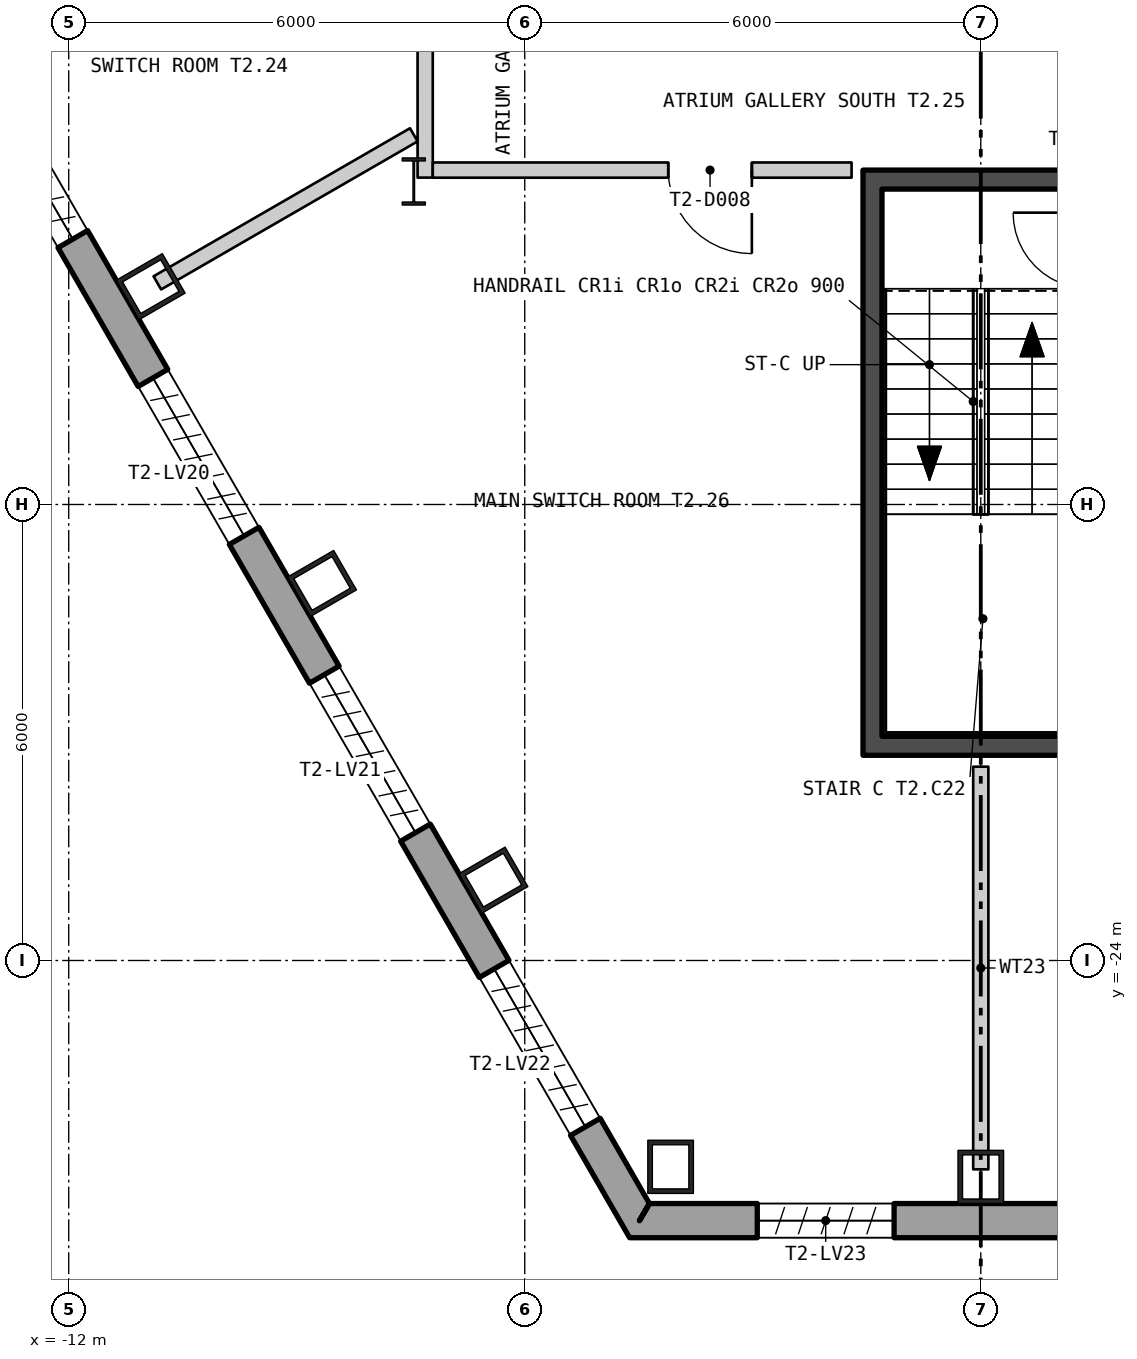
"""IFC4 building model, lengths in metres.
Left out: names, types, materials, properties, quantities, classifications, styles, units other than length and angle.
Written with IfcOpenShell. Run it as: python <this file> out.ifc"""

import sys

from ifc_helpers import new_model, si_unit, direction, frame, frame_2d, origin, origin_2d, place, context, subcontext, project, spatial, polyline, rectangle, hollow_rectangle, i_section, outline, extrude, element, fill, save


model = new_model("IFC4")
c1 = context("Model", 3, precision=1e-05, world=origin(), true_north=direction((0.0, 1.0)))
c2 = subcontext(c1, "Body", "Model", "MODEL_VIEW")
j1 = project(units=[si_unit("LENGTHUNIT", "METRE"), si_unit("PLANEANGLEUNIT", "RADIAN")], contexts=[c1])
p1 = place(None, origin())
s1 = spatial("IfcSite", under=j1, at=p1, CompositionType="ELEMENT")
p2 = place(p1, origin())
s2 = spatial("IfcBuilding", under=s1, at=p2, CompositionType="ELEMENT")
p3 = place(p2, frame((0.0, 0.0, 133.8)))
s3 = spatial("IfcBuildingStorey", under=s2, at=p3, CompositionType="ELEMENT", Elevation=133.8)
for number, where, z_axis, x_axis in (
    (1, (-10.921, -15.134, 0.0), (0.0, 0.0, 1.0), (0.5, -0.866, 0.0)),
    (2, (-8.667, -19.039, 0.0), (0.0, 0.0, 1.0), (0.5, -0.866, 0.0)),
    (3, (-6.412, -22.943, 0.0), (0.0, 0.0, 1.0), (0.5, -0.866, 0.0)),
    (4, (-4.081, -26.715, 0.0), (0.0, 0.0, 1.0), (1.0, 0.0, 0.0)),
    (5, (0.0, -26.848, 0.0), (0.0, 0.0, 1.0), (1.0, 0.0, 0.0)),
):
    element("IfcColumn", number, at=place(p3, frame(where, z_axis=z_axis, x_axis=x_axis)), inside=s3, PredefinedType="COLUMN", context=c2, shape_type="SweptSolid", body=[
        extrude(hollow_rectangle(XDim=0.6, YDim=0.7, WallThickness=0.06, at=origin_2d()), origin(), (0.0, 0.0, 1.0), 6.0),
    ])
p4 = place(p3, frame((-7.46, -13.75, 0.0), z_axis=(0.0, 0.0, 1.0), x_axis=(1.0, 0.0, 0.0)))
e6 = element("IfcColumn", 6, at=p4, inside=s3, PredefinedType="COLUMN", context=c2, shape_type="SweptSolid", body=[
    extrude(i_section(OverallWidth=0.305, OverallDepth=0.62, WebThickness=0.021, FlangeThickness=0.04, at=origin_2d()), origin(), (0.0, 0.0, 1.0), 6.0),
])
p5 = place(p3, frame((-27.365, 12.198, -0.18), z_axis=(0.0, 0.0, 1.0), x_axis=(0.500000335318, -0.866025210188, 0.0)))
e7 = element("IfcWall", 7, at=p5, inside=s3, PredefinedType="SOLIDWALL", context=c2, shape_type="SweptSolid", body=[
    extrude(outline(polyline([(-0.13, -0.225), (45.88, -0.225), (45.62, 0.225), (0.13, 0.225), (-0.13, -0.225)])), origin(), (0.0, 0.0, 1.0), 6.0),
])
p6 = place(p5, frame((1.425, 0.0, 1.38)))
e8 = element("IfcOpeningElement", 8, at=p6, cuts=e7, PredefinedType="OPENING", context=c2, shape_type="SweptSolid", body=[
    extrude(rectangle(XDim=2.4, YDim=3.6, at=frame_2d((1.2, 1.8))), frame((0.0, 0.235, 0.0), z_axis=(0.0, -1.0, 0.0), x_axis=(1.0, 0.0, 0.0)), (0.0, 0.0, 1.0), 0.47),
])
p7 = place(p5, frame((5.895, 0.0, 1.38)))
e9 = element("IfcOpeningElement", 9, at=p7, cuts=e7, PredefinedType="OPENING", context=c2, shape_type="SweptSolid", body=[
    extrude(rectangle(XDim=2.4, YDim=3.6, at=frame_2d((1.2, 1.8))), frame((0.0, 0.235, 0.0), z_axis=(0.0, -1.0, 0.0), x_axis=(1.0, 0.0, 0.0)), (0.0, 0.0, 1.0), 0.47),
])
p8 = place(p5, frame((10.403, 0.0, 1.38)))
e10 = element("IfcOpeningElement", 10, at=p8, cuts=e7, PredefinedType="OPENING", context=c2, shape_type="SweptSolid", body=[
    extrude(rectangle(XDim=2.4, YDim=3.6, at=frame_2d((1.2, 1.8))), frame((0.0, 0.235, 0.0), z_axis=(0.0, -1.0, 0.0), x_axis=(1.0, 0.0, 0.0)), (0.0, 0.0, 1.0), 0.47),
])
p9 = place(p5, frame((14.912, 0.0, 1.38)))
e11 = element("IfcOpeningElement", 11, at=p9, cuts=e7, PredefinedType="OPENING", context=c2, shape_type="SweptSolid", body=[
    extrude(rectangle(XDim=2.4, YDim=3.6, at=frame_2d((1.2, 1.8))), frame((0.0, 0.235, 0.0), z_axis=(0.0, -1.0, 0.0), x_axis=(1.0, 0.0, 0.0)), (0.0, 0.0, 1.0), 0.47),
])
p10 = place(p5, frame((19.421, 0.0, 1.38)))
e12 = element("IfcOpeningElement", 12, at=p10, cuts=e7, PredefinedType="OPENING", context=c2, shape_type="SweptSolid", body=[
    extrude(rectangle(XDim=2.4, YDim=3.6, at=frame_2d((1.2, 1.8))), frame((0.0, 0.235, 0.0), z_axis=(0.0, -1.0, 0.0), x_axis=(1.0, 0.0, 0.0)), (0.0, 0.0, 1.0), 0.47),
])
p11 = place(p5, frame((23.929, 0.0, 1.38)))
e13 = element("IfcOpeningElement", 13, at=p11, cuts=e7, PredefinedType="OPENING", context=c2, shape_type="SweptSolid", body=[
    extrude(rectangle(XDim=2.4, YDim=3.6, at=frame_2d((1.2, 1.8))), frame((0.0, 0.235, 0.0), z_axis=(0.0, -1.0, 0.0), x_axis=(1.0, 0.0, 0.0)), (0.0, 0.0, 1.0), 0.47),
])
p12 = place(p5, frame((28.438, 0.0, 1.38)))
e14 = element("IfcOpeningElement", 14, at=p12, cuts=e7, PredefinedType="OPENING", context=c2, shape_type="SweptSolid", body=[
    extrude(rectangle(XDim=2.4, YDim=3.6, at=frame_2d((1.2, 1.8))), frame((0.0, 0.235, 0.0), z_axis=(0.0, -1.0, 0.0), x_axis=(1.0, 0.0, 0.0)), (0.0, 0.0, 1.0), 0.47),
])
p13 = place(p5, frame((32.947, 0.0, 1.38)))
e15 = element("IfcOpeningElement", 15, at=p13, cuts=e7, PredefinedType="OPENING", context=c2, shape_type="SweptSolid", body=[
    extrude(rectangle(XDim=2.4, YDim=3.6, at=frame_2d((1.2, 1.8))), frame((0.0, 0.235, 0.0), z_axis=(0.0, -1.0, 0.0), x_axis=(1.0, 0.0, 0.0)), (0.0, 0.0, 1.0), 0.47),
])
p14 = place(p5, frame((37.455, 0.0, 1.38)))
e16 = element("IfcOpeningElement", 16, at=p14, cuts=e7, PredefinedType="OPENING", context=c2, shape_type="SweptSolid", body=[
    extrude(rectangle(XDim=2.4, YDim=3.6, at=frame_2d((1.2, 1.8))), frame((0.0, 0.235, 0.0), z_axis=(0.0, -1.0, 0.0), x_axis=(1.0, 0.0, 0.0)), (0.0, 0.0, 1.0), 0.47),
])
p15 = place(p5, frame((41.925, 0.0, 1.38)))
e17 = element("IfcOpeningElement", 17, at=p15, cuts=e7, PredefinedType="OPENING", context=c2, shape_type="SweptSolid", body=[
    extrude(rectangle(XDim=2.4, YDim=3.6, at=frame_2d((1.2, 1.8))), frame((0.0, 0.235, 0.0), z_axis=(0.0, -1.0, 0.0), x_axis=(1.0, 0.0, 0.0)), (0.0, 0.0, 1.0), 0.47),
])
p16 = place(p3, frame((-4.49, -27.423, -0.18), z_axis=(0.0, 0.0, 1.0), x_axis=(1.0, 0.0, 0.0)))
e18 = element("IfcWall", 18, at=p16, inside=s3, PredefinedType="SOLIDWALL", context=c2, shape_type="SweptSolid", body=[
    extrude(outline(polyline([(-0.13, -0.225), (9.11, -0.225), (8.85, 0.225), (0.13, 0.225), (-0.13, -0.225)])), origin(), (0.0, 0.0, 1.0), 6.0),
])
p17 = place(p16, frame((1.549, 0.0, 1.38)))
e19 = element("IfcOpeningElement", 19, at=p17, cuts=e18, PredefinedType="OPENING", context=c2, shape_type="SweptSolid", body=[
    extrude(rectangle(XDim=1.8, YDim=3.6, at=frame_2d((0.9, 1.8))), frame((0.0, 0.235, 0.0), z_axis=(0.0, -1.0, 0.0), x_axis=(1.0, 0.0, 0.0)), (0.0, 0.0, 1.0), 0.47),
])
p18 = place(p16, frame((5.631, 0.0, 1.38)))
e20 = element("IfcOpeningElement", 20, at=p18, cuts=e18, PredefinedType="OPENING", context=c2, shape_type="SweptSolid", body=[
    extrude(rectangle(XDim=1.8, YDim=3.6, at=frame_2d((0.9, 1.8))), frame((0.0, 0.235, 0.0), z_axis=(0.0, -1.0, 0.0), x_axis=(1.0, 0.0, 0.0)), (0.0, 0.0, 1.0), 0.47),
])
p19 = place(p3, frame((-1.425, -21.05, 0.0), z_axis=(0.0, 0.0, 1.0), x_axis=(0.0, 1.0, 0.0)))
e21 = element("IfcWall", 21, at=p19, inside=s3, PredefinedType="SHEAR", context=c2, shape_type="SweptSolid", body=[
    extrude(rectangle(XDim=7.2, YDim=0.25, at=frame_2d((3.6, 0.0))), origin(), (0.0, 0.0, 1.0), 5.8),
])
for number, where, z_axis, x_axis in (
    (22, (-1.55, -21.175, 0.0), (0.0, 0.0, 1.0), (1.0, 0.0, 0.0)),
    (23, (-1.55, -13.725, 0.0), (0.0, 0.0, 1.0), (1.0, 0.0, 0.0)),
):
    element("IfcWall", number, at=place(p3, frame(where, z_axis=z_axis, x_axis=x_axis)), inside=s3, PredefinedType="SHEAR", context=c2, shape_type="SweptSolid", body=[
        extrude(rectangle(XDim=3.1, YDim=0.25, at=frame_2d((1.55, 0.0))), origin(), (0.0, 0.0, 1.0), 5.8),
    ])
p20 = place(p3, frame((-10.834, -15.084, 0.0), z_axis=(0.0, 0.0, 1.0), x_axis=(0.866023159588, 0.500003887042, 0.0)))
e24 = element("IfcWall", 24, at=p20, inside=s3, PredefinedType="PARTITIONING", context=c2, shape_type="SweptSolid", body=[
    extrude(rectangle(XDim=3.896, YDim=0.2, at=frame_2d((1.948, 0.0))), origin(), (0.0, 0.0, 1.0), 5.8),
])
p21 = place(p3, frame((-7.31, -13.699, 0.0), z_axis=(0.0, 0.0, 1.0), x_axis=(-8.5722449e-05, 0.999999996326, 0.0)))
e25 = element("IfcWall", 25, at=p21, inside=s3, PredefinedType="PARTITIONING", context=c2, shape_type="SweptSolid", body=[
    extrude(rectangle(XDim=10.499, YDim=0.2, at=frame_2d((5.25, 0.0))), origin(), (0.0, 0.0, 1.0), 5.21),
])
p22 = place(p21, frame((2.653, 0.0, 0.0)))
e26 = element("IfcOpeningElement", 26, at=p22, cuts=e25, PredefinedType="OPENING", context=c2, shape_type="SweptSolid", body=[
    extrude(rectangle(XDim=1.1, YDim=2.1, at=frame_2d((0.55, 1.05))), frame((0.0, 0.11, 0.0), z_axis=(0.0, -1.0, 0.0), x_axis=(1.0, 0.0, 0.0)), (0.0, 0.0, 1.0), 0.22),
])
p23 = place(p21, frame((6.056, 0.0, 0.0)))
e27 = element("IfcOpeningElement", 27, at=p23, cuts=e25, PredefinedType="OPENING", context=c2, shape_type="SweptSolid", body=[
    extrude(rectangle(XDim=1.1, YDim=2.1, at=frame_2d((0.55, 1.05))), frame((0.0, 0.11, 0.0), z_axis=(0.0, -1.0, 0.0), x_axis=(1.0, 0.0, 0.0)), (0.0, 0.0, 1.0), 0.22),
])
p24 = place(p3, frame((-7.21, -13.6, 0.0), z_axis=(0.0, 0.0, 1.0), x_axis=(1.0, 0.0, 0.0)))
e28 = element("IfcWall", 28, at=p24, inside=s3, PredefinedType="PARTITIONING", context=c2, shape_type="SweptSolid", body=[
    extrude(rectangle(XDim=5.51, YDim=0.2, at=frame_2d((2.755, 0.0))), origin(), (0.0, 0.0, 1.0), 4.89),
])
p25 = place(p24, frame((3.098, 0.0, 0.0)))
e29 = element("IfcOpeningElement", 29, at=p25, cuts=e28, PredefinedType="OPENING", context=c2, shape_type="SweptSolid", body=[
    extrude(rectangle(XDim=1.1, YDim=2.1, at=frame_2d((0.55, 1.05))), frame((0.0, 0.11, 0.0), z_axis=(0.0, -1.0, 0.0), x_axis=(1.0, 0.0, 0.0)), (0.0, 0.0, 1.0), 0.22),
])
p26 = place(p3, frame((0.0, -26.748, 0.0), z_axis=(0.0, 0.0, 1.0), x_axis=(0.0, 1.0, 0.0)))
e30 = element("IfcWall", 30, at=p26, inside=s3, PredefinedType="PARTITIONING", context=c2, shape_type="SweptSolid", body=[
    extrude(rectangle(XDim=5.298, YDim=0.2, at=frame_2d((2.649, 0.0))), origin(), (0.0, 0.0, 1.0), 5.25),
])
p27 = place(p25, origin())
e31 = element("IfcDoor", 31, at=p27, inside=s3, OperationType="SINGLE_SWING_RIGHT", PredefinedType="DOOR", context=c2, shape_type="SweptSolid", body=[
    extrude(rectangle(XDim=1.1, YDim=2.1, at=frame_2d((0.55, 1.05))), frame((0.0, 0.025, 0.0), z_axis=(0.0, -1.0, 0.0), x_axis=(1.0, 0.0, 0.0)), (0.0, 0.0, 1.0), 0.05),
])
fill(e29, e31)
save(model, sys.argv[1])
